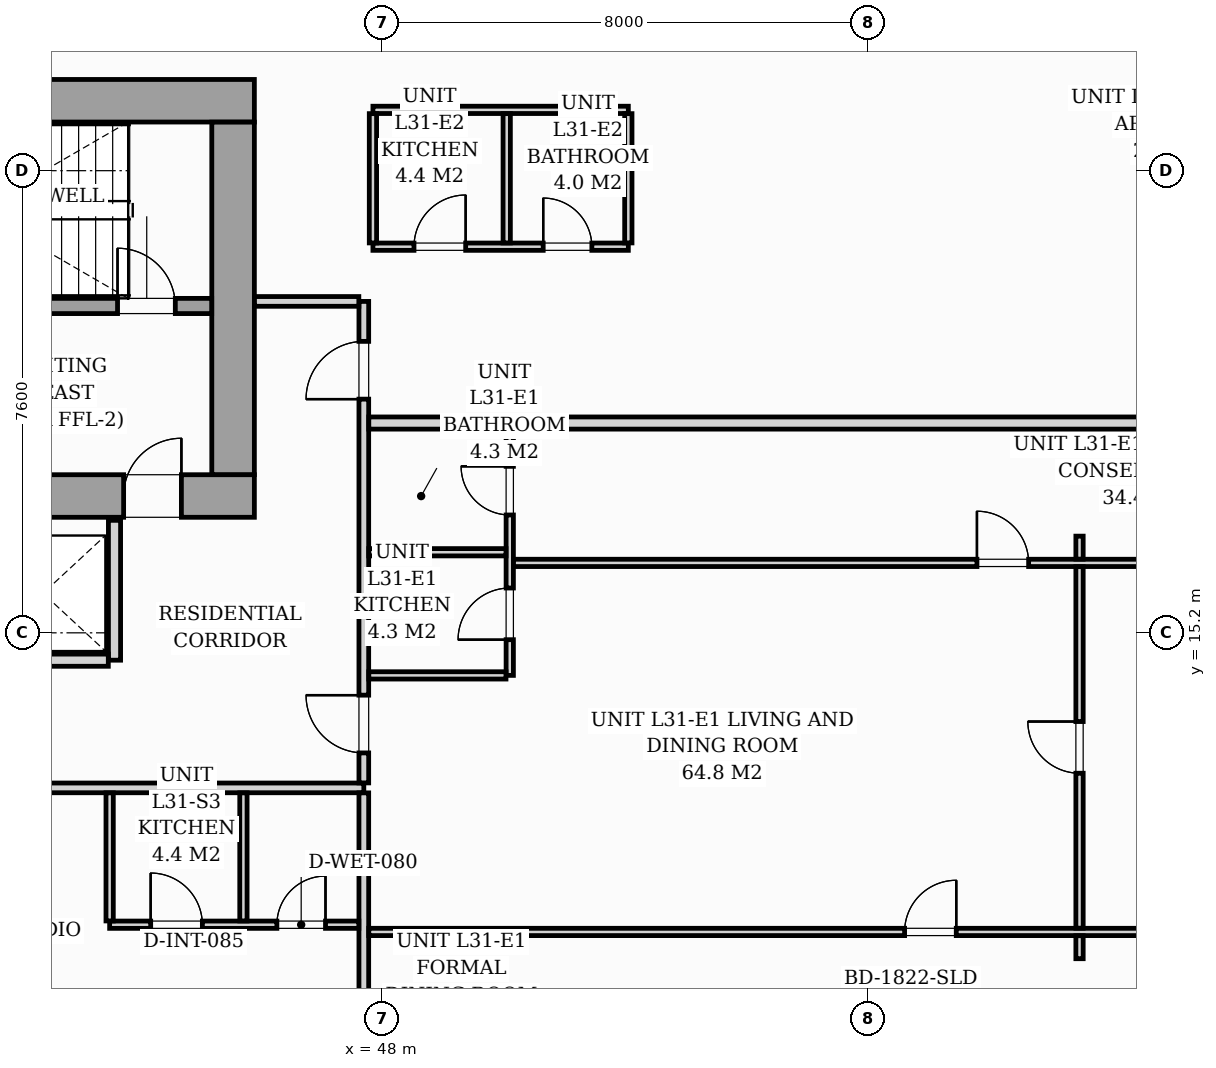
"""IFC4 building model, lengths in metres.
Left out: names, types, materials, properties, quantities, classifications, styles, units other than length and angle.
Written with IfcOpenShell. Run it as: python <this file> out.ifc"""

import sys

from ifc_helpers import new_model, si_unit, direction, frame, frame_2d, origin, origin_2d, place, context, subcontext, project, spatial, rectangle, i_section, extrude, source, transform, mapped, element, fill, save


model = new_model("IFC4")
c1 = context("Model", 3, precision=1e-05, world=origin(), true_north=direction((0.0, 1.0)))
c2 = subcontext(c1, "Body", "Model", "MODEL_VIEW")
j1 = project(units=[si_unit("LENGTHUNIT", "METRE"), si_unit("PLANEANGLEUNIT", "RADIAN")], contexts=[c1])
p1 = place(None, origin())
s1 = spatial("IfcSite", under=j1, at=p1, CompositionType="ELEMENT")
p2 = place(p1, origin())
s2 = spatial("IfcBuilding", under=s1, at=p2, CompositionType="ELEMENT")
p3 = place(p2, frame((0.0, 0.0, 109.8)))
s3 = spatial("IfcBuildingStorey", under=s2, at=p3, CompositionType="ELEMENT", Elevation=109.8)
m1 = source(origin(), c2, "Body", "SweptSolid", [
    extrude(i_section(OverallWidth=0.427, OverallDepth=0.483, WebThickness=0.051, FlangeThickness=0.082, FilletRadius=0.018, at=origin_2d()), origin(), (0.0, 0.0, 1.0), 3.196),
])
for number, where, z_axis, x_axis in (
    (1, (45.6, 17.4, 0.002), (0.0, 0.0, 1.0), (1.0, 0.0, 0.0)),
    (2, (45.6, 24.0, 0.002), (0.0, 0.0, 1.0), (1.0, 0.0, 0.0)),
):
    element("IfcColumn", number, at=place(p3, frame(where, z_axis=z_axis, x_axis=x_axis)), inside=s3, PredefinedType="PILASTER", context=c2, shape_type="MappedRepresentation", body=[
        mapped(m1, transform((0.0, 0.0, 0.0), scale=1.0)),
    ])
m2 = source(origin(), c2, "Body", "SweptSolid", [
    extrude(rectangle(XDim=0.9, YDim=1.1, at=origin_2d()), origin(), (0.0, 0.0, 1.0), 3.196),
])
p4 = place(p3, frame((53.085, 8.776, 0.002), z_axis=(0.0, 0.0, 1.0), x_axis=(0.995396198367, 0.09584575252, 0.0)))
e3 = element("IfcColumn", 3, at=p4, inside=s3, PredefinedType="COLUMN", context=c2, shape_type="MappedRepresentation", body=[
    mapped(m2, transform((0.0, 0.0, 0.0), scale=1.0)),
])
p5 = place(p3, frame((26.1, 17.45, 0.0), z_axis=(0.0, 0.0, 1.0), x_axis=(1.0, 0.0, 0.0)))
e4 = element("IfcWall", 4, at=p5, inside=s3, PredefinedType="SHEAR", context=c2, shape_type="SweptSolid", body=[
    extrude(rectangle(XDim=19.8, YDim=0.7, at=frame_2d((9.9, 0.0))), origin(), (0.0, 0.0, 1.0), 3.2),
])
p6 = place(p5, frame((1.05, 0.0, 0.0)))
e5 = element("IfcOpeningElement", 5, at=p6, cuts=e4, PredefinedType="OPENING", context=c2, shape_type="SweptSolid", body=[
    extrude(rectangle(XDim=0.95, YDim=2.06, at=frame_2d((0.475, 1.03))), frame((0.0, 0.36, 0.0), z_axis=(0.0, -1.0, 0.0), x_axis=(1.0, 0.0, 0.0)), (0.0, 0.0, 1.0), 0.72),
])
p7 = place(p5, frame((9.48, 0.0, 0.0)))
e6 = element("IfcOpeningElement", 6, at=p7, cuts=e4, PredefinedType="OPENING", context=c2, shape_type="SweptSolid", body=[
    extrude(rectangle(XDim=0.85, YDim=2.0, at=frame_2d((0.425, 1.0))), frame((0.0, 0.36, 0.0), z_axis=(0.0, -1.0, 0.0), x_axis=(1.0, 0.0, 0.0)), (0.0, 0.0, 1.0), 0.72),
])
p8 = place(p5, frame((17.65, 0.0, 0.0)))
e7 = element("IfcOpeningElement", 7, at=p8, cuts=e4, PredefinedType="OPENING", context=c2, shape_type="SweptSolid", body=[
    extrude(rectangle(XDim=0.95, YDim=2.06, at=frame_2d((0.475, 1.03))), frame((0.0, 0.36, 0.0), z_axis=(0.0, -1.0, 0.0), x_axis=(1.0, 0.0, 0.0)), (0.0, 0.0, 1.0), 0.72),
])
p9 = place(p3, frame((26.1, 23.95, 0.0), z_axis=(0.0, 0.0, 1.0), x_axis=(1.0, 0.0, 0.0)))
e8 = element("IfcWall", 8, at=p9, inside=s3, PredefinedType="SHEAR", context=c2, shape_type="SweptSolid", body=[
    extrude(rectangle(XDim=19.8, YDim=0.7, at=frame_2d((9.9, 0.0))), origin(), (0.0, 0.0, 1.0), 3.2),
])
p10 = place(p3, frame((45.55, 17.802, 0.0), z_axis=(0.0, 0.0, 1.0), x_axis=(0.0, 1.0, 0.0)))
e9 = element("IfcWall", 9, at=p10, inside=s3, PredefinedType="SHEAR", context=c2, shape_type="SweptSolid", body=[
    extrude(rectangle(XDim=5.796, YDim=0.7, at=frame_2d((2.898, 0.0))), origin(), (0.0, 0.0, 1.0), 3.2),
])
p11 = place(p3, frame((37.05, 20.575, 0.0), z_axis=(0.0, 0.0, 1.0), x_axis=(1.0, 0.0, 0.0)))
e10 = element("IfcWall", 10, at=p11, inside=s3, PredefinedType="SOLIDWALL", context=c2, shape_type="SweptSolid", body=[
    extrude(rectangle(XDim=8.148, YDim=0.25, at=frame_2d((4.074, 0.0))), origin(), (0.0, 0.0, 1.0), 3.2),
])
p12 = place(p11, frame((6.6, 0.0, 0.0)))
e11 = element("IfcOpeningElement", 11, at=p12, cuts=e10, PredefinedType="OPENING", context=c2, shape_type="SweptSolid", body=[
    extrude(rectangle(XDim=0.95, YDim=2.06, at=frame_2d((0.475, 1.03))), frame((0.0, 0.135, 0.0), z_axis=(0.0, -1.0, 0.0), x_axis=(1.0, 0.0, 0.0)), (0.0, 0.0, 1.0), 0.27),
])
p13 = place(p3, frame((43.6, 14.75, 0.0), z_axis=(0.0, 0.0, 1.0), x_axis=(0.0, 1.0, 0.0)))
e12 = element("IfcWall", 12, at=p13, inside=s3, PredefinedType="PARTITIONING", context=c2, shape_type="SweptSolid", body=[
    extrude(rectangle(XDim=2.3, YDim=0.2, at=frame_2d((1.15, 0.0))), origin(), (0.0, 0.0, 1.0), 2.94),
])
p14 = place(p3, frame((41.352, 14.75, 0.0), z_axis=(0.0, 0.0, 1.0), x_axis=(1.0, 0.0, 0.0)))
e13 = element("IfcWall", 13, at=p14, inside=s3, PredefinedType="PARTITIONING", context=c2, shape_type="SweptSolid", body=[
    extrude(rectangle(XDim=2.146, YDim=0.2, at=frame_2d((1.073, 0.0))), origin(), (0.0, 0.0, 1.0), 2.94),
])
p15 = place(p3, frame((21.5, 12.65, 0.0), z_axis=(0.0, 0.0, 1.0), x_axis=(1.0, 0.0, 0.0)))
e14 = element("IfcWall", 14, at=p15, inside=s3, PredefinedType="PARTITIONING", context=c2, shape_type="SweptSolid", body=[
    extrude(rectangle(XDim=26.2, YDim=0.16, at=frame_2d((13.1, 0.0))), origin(), (0.0, 0.0, 1.0), 2.94),
])
p16 = place(p15, frame((5.927, 0.0, 0.0)))
e15 = element("IfcOpeningElement", 15, at=p16, cuts=e14, PredefinedType="OPENING", context=c2, shape_type="SweptSolid", body=[
    extrude(rectangle(XDim=0.95, YDim=2.06, at=frame_2d((0.475, 1.03))), frame((0.0, 0.09, 0.0), z_axis=(0.0, -1.0, 0.0), x_axis=(1.0, 0.0, 0.0)), (0.0, 0.0, 1.0), 0.18),
])
p17 = place(p15, frame((10.575, 0.0, 0.0)))
e16 = element("IfcOpeningElement", 16, at=p17, cuts=e14, PredefinedType="OPENING", context=c2, shape_type="SweptSolid", body=[
    extrude(rectangle(XDim=0.95, YDim=2.06, at=frame_2d((0.475, 1.03))), frame((0.0, 0.09, 0.0), z_axis=(0.0, -1.0, 0.0), x_axis=(1.0, 0.0, 0.0)), (0.0, 0.0, 1.0), 0.18),
])
p18 = place(p15, frame((19.322, 0.0, 0.0)))
e17 = element("IfcOpeningElement", 17, at=p18, cuts=e14, PredefinedType="OPENING", context=c2, shape_type="SweptSolid", body=[
    extrude(rectangle(XDim=0.95, YDim=2.06, at=frame_2d((0.475, 1.03))), frame((0.0, 0.09, 0.0), z_axis=(0.0, -1.0, 0.0), x_axis=(1.0, 0.0, 0.0)), (0.0, 0.0, 1.0), 0.18),
])
p19 = place(p3, frame((47.7, 7.153, 0.0), z_axis=(0.0, 0.0, 1.0), x_axis=(0.0, 1.0, 0.0)))
e18 = element("IfcWall", 18, at=p19, inside=s3, PredefinedType="PARTITIONING", context=c2, shape_type="SweptSolid", body=[
    extrude(rectangle(XDim=5.416, YDim=0.16, at=frame_2d((2.708, 0.0))), origin(), (0.0, 0.0, 1.0), 2.94),
])
p20 = place(p3, frame((47.7, 12.732, 0.0), z_axis=(0.0, 0.0, 1.0), x_axis=(0.0, 1.0, 0.0)))
e19 = element("IfcWall", 19, at=p20, inside=s3, PredefinedType="PARTITIONING", context=c2, shape_type="SweptSolid", body=[
    extrude(rectangle(XDim=7.918, YDim=0.16, at=frame_2d((3.959, 0.0))), origin(), (0.0, 0.0, 1.0), 2.94),
])
p21 = place(p20, frame((0.493, 0.0, 0.0)))
e20 = element("IfcOpeningElement", 20, at=p21, cuts=e19, PredefinedType="OPENING", context=c2, shape_type="SweptSolid", body=[
    extrude(rectangle(XDim=0.95, YDim=2.06, at=frame_2d((0.475, 1.03))), frame((0.0, 0.09, 0.0), z_axis=(0.0, -1.0, 0.0), x_axis=(1.0, 0.0, 0.0)), (0.0, 0.0, 1.0), 0.18),
])
p22 = place(p20, frame((6.311, 0.0, 0.0)))
e21 = element("IfcOpeningElement", 21, at=p22, cuts=e19, PredefinedType="OPENING", context=c2, shape_type="SweptSolid", body=[
    extrude(rectangle(XDim=0.95, YDim=2.06, at=frame_2d((0.475, 1.03))), frame((0.0, 0.09, 0.0), z_axis=(0.0, -1.0, 0.0), x_axis=(1.0, 0.0, 0.0)), (0.0, 0.0, 1.0), 0.18),
])
p23 = place(p3, frame((45.902, 20.65, 0.0), z_axis=(0.0, 0.0, 1.0), x_axis=(1.0, 0.0, 0.0)))
e22 = element("IfcWall", 22, at=p23, inside=s3, PredefinedType="PARTITIONING", context=c2, shape_type="SweptSolid", body=[
    extrude(rectangle(XDim=1.716, YDim=0.16, at=frame_2d((0.858, 0.0))), origin(), (0.0, 0.0, 1.0), 2.94),
])
p24 = place(p3, frame((43.52, 10.4, 0.0), z_axis=(0.0, 0.0, 1.0), x_axis=(1.0, 0.0, 0.0)))
e23 = element("IfcWall", 23, at=p24, inside=s3, PredefinedType="PARTITIONING", context=c2, shape_type="SweptSolid", body=[
    extrude(rectangle(XDim=4.098, YDim=0.12, at=frame_2d((2.049, 0.0))), origin(), (0.0, 0.0, 1.0), 2.94),
])
p25 = place(p24, frame((0.675, 0.0, 0.0)))
e24 = element("IfcOpeningElement", 24, at=p25, cuts=e23, PredefinedType="OPENING", context=c2, shape_type="SweptSolid", body=[
    extrude(rectangle(XDim=0.85, YDim=2.05, at=frame_2d((0.425, 1.025))), frame((0.0, 0.07, 0.0), z_axis=(0.0, -1.0, 0.0), x_axis=(1.0, 0.0, 0.0)), (0.0, 0.0, 1.0), 0.14),
])
p26 = place(p24, frame((2.75, 0.0, 0.0)))
e25 = element("IfcOpeningElement", 25, at=p26, cuts=e23, PredefinedType="OPENING", context=c2, shape_type="SweptSolid", body=[
    extrude(rectangle(XDim=0.8, YDim=2.02, at=frame_2d((0.4, 1.01))), frame((0.0, 0.07, 0.0), z_axis=(0.0, -1.0, 0.0), x_axis=(1.0, 0.0, 0.0)), (0.0, 0.0, 1.0), 0.14),
])
for number, where, z_axis, x_axis in (
    (26, (43.52, 10.462, 0.0), (0.0, 0.0, 1.0), (0.0, 1.0, 0.0)),
    (27, (45.72, 10.462, 0.0), (0.0, 0.0, 1.0), (0.0, 1.0, 0.0)),
):
    element("IfcWall", number, at=place(p3, frame(where, z_axis=z_axis, x_axis=x_axis)), inside=s3, PredefinedType="PARTITIONING", context=c2, shape_type="SweptSolid", body=[
        extrude(rectangle(XDim=2.106, YDim=0.12, at=frame_2d((1.053, 0.0))), origin(), (0.0, 0.0, 1.0), 2.94),
    ])
p27 = place(p3, frame((47.782, 18.65, 0.0), z_axis=(0.0, 0.0, 1.0), x_axis=(1.0, 0.0, 0.0)))
e28 = element("IfcWall", 28, at=p27, inside=s3, PredefinedType="PARTITIONING", context=c2, shape_type="SweptSolid", body=[
    extrude(rectangle(XDim=21.049, YDim=0.2, at=frame_2d((10.525, 0.0))), origin(), (0.0, 0.0, 1.0), 2.063),
])
p28 = place(p3, frame((50.1, 14.5, 0.0), z_axis=(0.0, 0.0, 1.0), x_axis=(0.0, 1.0, 0.0)))
e29 = element("IfcWall", 29, at=p28, inside=s3, PredefinedType="PARTITIONING", context=c2, shape_type="SweptSolid", body=[
    extrude(rectangle(XDim=4.048, YDim=0.12, at=frame_2d((2.024, 0.0))), origin(), (0.0, 0.0, 1.0), 2.94),
])
p29 = place(p28, frame((0.587, 0.0, 0.0)))
e30 = element("IfcOpeningElement", 30, at=p29, cuts=e29, PredefinedType="OPENING", context=c2, shape_type="SweptSolid", body=[
    extrude(rectangle(XDim=0.85, YDim=2.05, at=frame_2d((0.425, 1.025))), frame((0.0, 0.07, 0.0), z_axis=(0.0, -1.0, 0.0), x_axis=(1.0, 0.0, 0.0)), (0.0, 0.0, 1.0), 0.14),
])
p30 = place(p28, frame((2.638, 0.0, 0.0)))
e31 = element("IfcOpeningElement", 31, at=p30, cuts=e29, PredefinedType="OPENING", context=c2, shape_type="SweptSolid", body=[
    extrude(rectangle(XDim=0.8, YDim=2.02, at=frame_2d((0.4, 1.01))), frame((0.0, 0.07, 0.0), z_axis=(0.0, -1.0, 0.0), x_axis=(1.0, 0.0, 0.0)), (0.0, 0.0, 1.0), 0.14),
])
for number, where, z_axis, x_axis in (
    (32, (47.782, 16.525, 0.0), (0.0, 0.0, 1.0), (1.0, 0.0, 0.0)),
    (33, (47.782, 14.5, 0.0), (0.0, 0.0, 1.0), (1.0, 0.0, 0.0)),
):
    element("IfcWall", number, at=place(p3, frame(where, z_axis=z_axis, x_axis=x_axis)), inside=s3, PredefinedType="PARTITIONING", context=c2, shape_type="SweptSolid", body=[
        extrude(rectangle(XDim=2.256, YDim=0.12, at=frame_2d((1.128, 0.0))), origin(), (0.0, 0.0, 1.0), 2.94),
    ])
p31 = place(p3, frame((47.782, 10.281, 0.0), z_axis=(0.0, 0.0, 1.0), x_axis=(1.0, 0.0, 0.0)))
e34 = element("IfcWall", 34, at=p31, inside=s3, PredefinedType="PARTITIONING", context=c2, shape_type="SweptSolid", body=[
    extrude(rectangle(XDim=18.472, YDim=0.12, at=frame_2d((9.236, 0.0))), origin(), (0.0, 0.0, 1.0), 2.94),
])
p32 = place(p31, frame((8.811, 0.0, 0.0)))
e35 = element("IfcOpeningElement", 35, at=p32, cuts=e34, PredefinedType="OPENING", context=c2, shape_type="SweptSolid", body=[
    extrude(rectangle(XDim=0.85, YDim=2.05, at=frame_2d((0.425, 1.025))), frame((0.0, 0.07, 0.0), z_axis=(0.0, -1.0, 0.0), x_axis=(1.0, 0.0, 0.0)), (0.0, 0.0, 1.0), 0.14),
])
p33 = place(p3, frame((50.162, 16.35, 0.0), z_axis=(0.0, 0.0, 1.0), x_axis=(1.0, 0.0, 0.0)))
e36 = element("IfcWall", 36, at=p33, inside=s3, PredefinedType="PARTITIONING", context=c2, shape_type="SweptSolid", body=[
    extrude(rectangle(XDim=16.092, YDim=0.12, at=frame_2d((8.046, 0.0))), origin(), (0.0, 0.0, 1.0), 2.94),
])
p34 = place(p33, frame((7.621, 0.0, 0.0)))
e37 = element("IfcOpeningElement", 37, at=p34, cuts=e36, PredefinedType="OPENING", context=c2, shape_type="SweptSolid", body=[
    extrude(rectangle(XDim=0.85, YDim=2.05, at=frame_2d((0.425, 1.025))), frame((0.0, 0.07, 0.0), z_axis=(0.0, -1.0, 0.0), x_axis=(1.0, 0.0, 0.0)), (0.0, 0.0, 1.0), 0.14),
])
p35 = place(p3, frame((59.47, 9.841, 0.0), z_axis=(0.0, 0.0, 1.0), x_axis=(0.0, 1.0, 0.0)))
e38 = element("IfcWall", 38, at=p35, inside=s3, PredefinedType="PARTITIONING", context=c2, shape_type="SweptSolid", body=[
    extrude(rectangle(XDim=0.378, YDim=0.12, at=frame_2d((0.189, 0.0))), origin(), (0.0, 0.0, 1.0), 2.94),
])
p36 = place(p3, frame((59.47, 10.343, 0.0), z_axis=(0.0, 0.0, 1.0), x_axis=(0.0, 1.0, 0.0)))
e39 = element("IfcWall", 39, at=p36, inside=s3, PredefinedType="PARTITIONING", context=c2, shape_type="SweptSolid", body=[
    extrude(rectangle(XDim=5.945, YDim=0.12, at=frame_2d((2.973, 0.0))), origin(), (0.0, 0.0, 1.0), 2.94),
])
p37 = place(p36, frame((2.548, 0.0, 0.0)))
e40 = element("IfcOpeningElement", 40, at=p37, cuts=e39, PredefinedType="OPENING", context=c2, shape_type="SweptSolid", body=[
    extrude(rectangle(XDim=0.85, YDim=2.05, at=frame_2d((0.425, 1.025))), frame((0.0, 0.07, 0.0), z_axis=(0.0, -1.0, 0.0), x_axis=(1.0, 0.0, 0.0)), (0.0, 0.0, 1.0), 0.14),
])
p38 = place(p3, frame((59.47, 16.412, 0.0), z_axis=(0.0, 0.0, 1.0), x_axis=(0.0, 1.0, 0.0)))
e41 = element("IfcWall", 41, at=p38, inside=s3, PredefinedType="PARTITIONING", context=c2, shape_type="SweptSolid", body=[
    extrude(rectangle(XDim=0.378, YDim=0.12, at=frame_2d((0.189, 0.0))), origin(), (0.0, 0.0, 1.0), 2.94),
])
p39 = place(p3, frame((47.85, 21.55, 0.0), z_axis=(0.0, 0.0, 1.0), x_axis=(1.0, 0.0, 0.0)))
e42 = element("IfcWall", 42, at=p39, inside=s3, PredefinedType="PARTITIONING", context=c2, shape_type="SweptSolid", body=[
    extrude(rectangle(XDim=4.2, YDim=0.12, at=frame_2d((2.1, 0.0))), origin(), (0.0, 0.0, 1.0), 2.94),
])
p40 = place(p39, frame((0.675, 0.0, 0.0)))
e43 = element("IfcOpeningElement", 43, at=p40, cuts=e42, PredefinedType="OPENING", context=c2, shape_type="SweptSolid", body=[
    extrude(rectangle(XDim=0.85, YDim=2.05, at=frame_2d((0.425, 1.025))), frame((0.0, 0.07, 0.0), z_axis=(0.0, -1.0, 0.0), x_axis=(1.0, 0.0, 0.0)), (0.0, 0.0, 1.0), 0.14),
])
p41 = place(p39, frame((2.8, 0.0, 0.0)))
e44 = element("IfcOpeningElement", 44, at=p41, cuts=e42, PredefinedType="OPENING", context=c2, shape_type="SweptSolid", body=[
    extrude(rectangle(XDim=0.8, YDim=2.02, at=frame_2d((0.4, 1.01))), frame((0.0, 0.07, 0.0), z_axis=(0.0, -1.0, 0.0), x_axis=(1.0, 0.0, 0.0)), (0.0, 0.0, 1.0), 0.14),
])
p42 = place(p3, frame((47.85, 23.8, 0.0), z_axis=(0.0, 0.0, 1.0), x_axis=(1.0, 0.0, 0.0)))
e45 = element("IfcWall", 45, at=p42, inside=s3, PredefinedType="PARTITIONING", context=c2, shape_type="SweptSolid", body=[
    extrude(rectangle(XDim=4.2, YDim=0.12, at=frame_2d((2.1, 0.0))), origin(), (0.0, 0.0, 1.0), 2.94),
])
for number, where, z_axis, x_axis in (
    (46, (47.85, 21.612, 0.0), (0.0, 0.0, 1.0), (0.0, 1.0, 0.0)),
    (47, (50.05, 21.612, 0.0), (0.0, 0.0, 1.0), (0.0, 1.0, 0.0)),
    (48, (52.05, 21.612, 0.0), (0.0, 0.0, 1.0), (0.0, 1.0, 0.0)),
):
    element("IfcWall", number, at=place(p3, frame(where, z_axis=z_axis, x_axis=x_axis)), inside=s3, PredefinedType="PARTITIONING", context=c2, shape_type="SweptSolid", body=[
        extrude(rectangle(XDim=2.126, YDim=0.12, at=frame_2d((1.063, 0.0))), origin(), (0.0, 0.0, 1.0), 2.94),
    ])
m3 = source(origin(), c2, "Body", "SweptSolid", [
    extrude(rectangle(XDim=0.95, YDim=2.06, at=frame_2d((0.475, 1.03))), frame((0.0, 0.025, 0.0), z_axis=(0.0, -1.0, 0.0), x_axis=(1.0, 0.0, 0.0)), (0.0, 0.0, 1.0), 0.05),
])
p43 = place(p8, origin())
e49 = element("IfcDoor", 49, at=p43, inside=s3, OperationType="SINGLE_SWING_RIGHT", PredefinedType="DOOR", context=c2, shape_type="MappedRepresentation", body=[
    mapped(m3, transform((0.0, 0.0, 0.0), scale=1.0)),
])
fill(e7, e49)
p44 = place(p12, origin())
e50 = element("IfcDoor", 50, at=p44, inside=s3, OperationType="SINGLE_SWING_LEFT", PredefinedType="DOOR", context=c2, shape_type="MappedRepresentation", body=[
    mapped(m3, transform((0.0, 0.0, 0.0), scale=1.0)),
])
fill(e11, e50)
m4 = source(origin(), c2, "Body", "SweptSolid", [
    extrude(rectangle(XDim=0.85, YDim=2.05, at=frame_2d((0.425, 1.025))), frame((0.0, 0.025, 0.0), z_axis=(0.0, -1.0, 0.0), x_axis=(1.0, 0.0, 0.0)), (0.0, 0.0, 1.0), 0.05),
])
p45 = place(p25, origin())
e51 = element("IfcDoor", 51, at=p45, inside=s3, OperationType="SINGLE_SWING_LEFT", PredefinedType="DOOR", context=c2, shape_type="MappedRepresentation", body=[
    mapped(m4, transform((0.0, 0.0, 0.0), scale=1.0)),
])
fill(e24, e51)
m5 = source(origin(), c2, "Body", "SweptSolid", [
    extrude(rectangle(XDim=0.8, YDim=2.02, at=frame_2d((0.4, 1.01))), frame((0.0, 0.025, 0.0), z_axis=(0.0, -1.0, 0.0), x_axis=(1.0, 0.0, 0.0)), (0.0, 0.0, 1.0), 0.05),
])
p46 = place(p26, origin())
e52 = element("IfcDoor", 52, at=p46, inside=s3, OperationType="SINGLE_SWING_RIGHT", PredefinedType="DOOR", context=c2, shape_type="MappedRepresentation", body=[
    mapped(m5, transform((0.0, 0.0, 0.0), scale=1.0)),
])
fill(e25, e52)
m6 = source(origin(), c2, "Body", "SweptSolid", [
    extrude(rectangle(XDim=0.95, YDim=2.06, at=frame_2d((0.475, 1.03))), frame((0.0, 0.025, 0.0), z_axis=(0.0, -1.0, 0.0), x_axis=(1.0, 0.0, 0.0)), (0.0, 0.0, 1.0), 0.05),
])
p47 = place(p21, origin())
e53 = element("IfcDoor", 53, at=p47, inside=s3, OperationType="SINGLE_SWING_RIGHT", PredefinedType="DOOR", context=c2, shape_type="MappedRepresentation", body=[
    mapped(m6, transform((0.0, 0.0, 0.0), scale=1.0)),
])
fill(e20, e53)
p48 = place(p29, origin())
e54 = element("IfcDoor", 54, at=p48, inside=s3, OperationType="SINGLE_SWING_LEFT", PredefinedType="DOOR", context=c2, shape_type="MappedRepresentation", body=[
    mapped(m4, transform((0.0, 0.0, 0.0), scale=1.0)),
])
fill(e30, e54)
p49 = place(p30, origin())
e55 = element("IfcDoor", 55, at=p49, inside=s3, OperationType="SINGLE_SWING_RIGHT", PredefinedType="DOOR", context=c2, shape_type="MappedRepresentation", body=[
    mapped(m5, transform((0.0, 0.0, 0.0), scale=1.0)),
])
fill(e31, e55)
p50 = place(p32, origin())
e56 = element("IfcDoor", 56, at=p50, inside=s3, OperationType="SINGLE_SWING_RIGHT", PredefinedType="DOOR", context=c2, shape_type="MappedRepresentation", body=[
    mapped(m4, transform((0.0, 0.0, 0.0), scale=1.0)),
])
fill(e35, e56)
p51 = place(p34, origin())
e57 = element("IfcDoor", 57, at=p51, inside=s3, OperationType="SINGLE_SWING_LEFT", PredefinedType="DOOR", context=c2, shape_type="MappedRepresentation", body=[
    mapped(m4, transform((0.0, 0.0, 0.0), scale=1.0)),
])
fill(e37, e57)
p52 = place(p37, origin())
e58 = element("IfcDoor", 58, at=p52, inside=s3, OperationType="SINGLE_SWING_RIGHT", PredefinedType="DOOR", context=c2, shape_type="MappedRepresentation", body=[
    mapped(m4, transform((0.0, 0.0, 0.0), scale=1.0)),
])
fill(e40, e58)
p53 = place(p22, origin())
e59 = element("IfcDoor", 59, at=p53, inside=s3, OperationType="SINGLE_SWING_LEFT", PredefinedType="DOOR", context=c2, shape_type="MappedRepresentation", body=[
    mapped(m6, transform((0.0, 0.0, 0.0), scale=1.0)),
])
fill(e21, e59)
p54 = place(p40, origin())
e60 = element("IfcDoor", 60, at=p54, inside=s3, OperationType="SINGLE_SWING_RIGHT", PredefinedType="DOOR", context=c2, shape_type="MappedRepresentation", body=[
    mapped(m4, transform((0.0, 0.0, 0.0), scale=1.0)),
])
fill(e43, e60)
p55 = place(p41, origin())
e61 = element("IfcDoor", 61, at=p55, inside=s3, OperationType="SINGLE_SWING_LEFT", PredefinedType="DOOR", context=c2, shape_type="MappedRepresentation", body=[
    mapped(m5, transform((0.0, 0.0, 0.0), scale=1.0)),
])
fill(e44, e61)
save(model, sys.argv[1])
